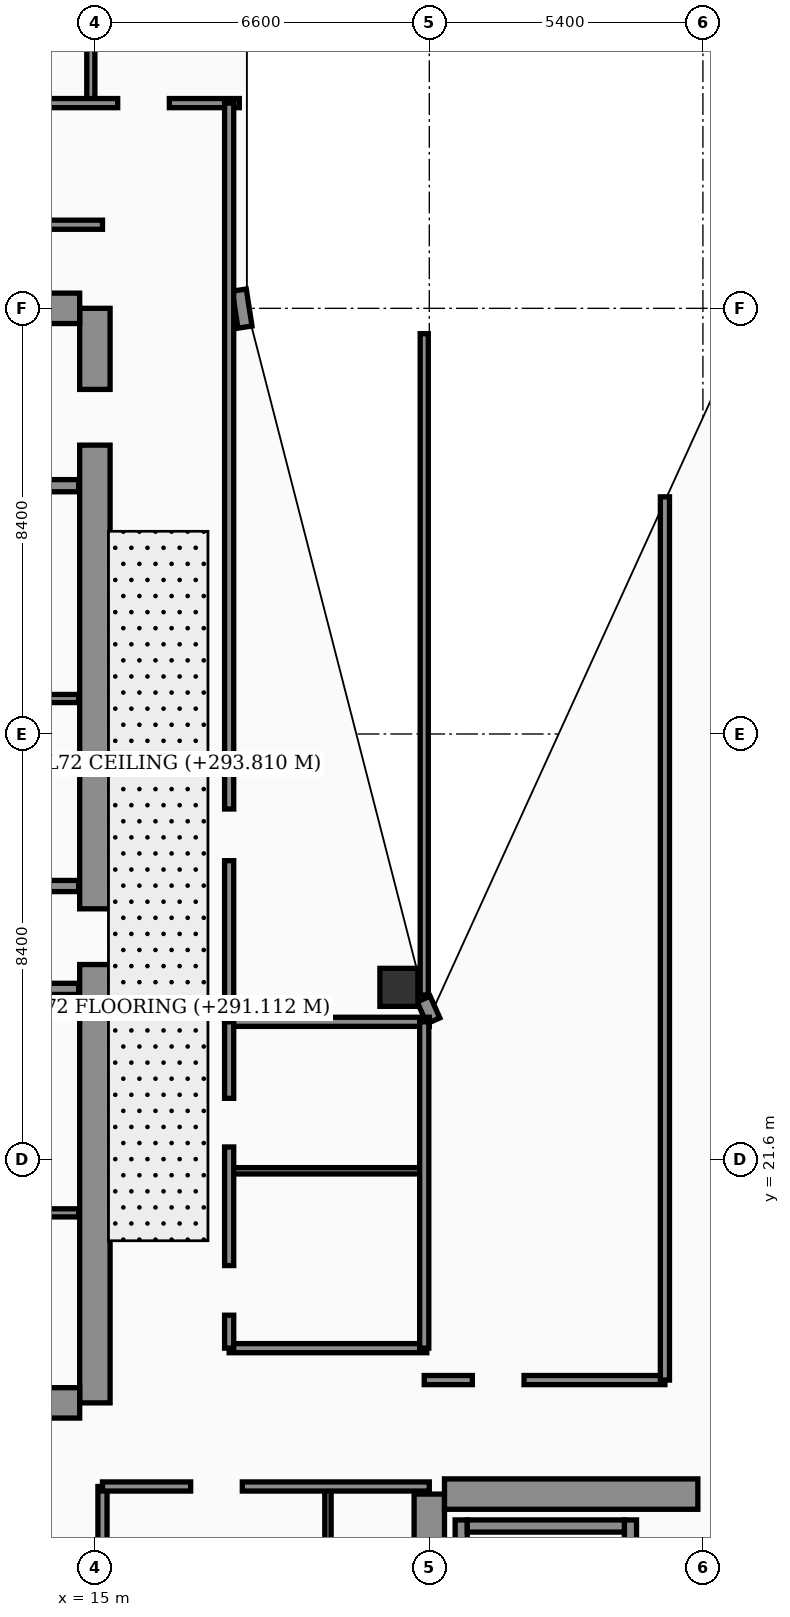
"""IFC4 building model, lengths in metres.
Left out: names, types, materials, properties, quantities, classifications, styles, units other than length and angle.
Written with IfcOpenShell. Run it as: python <this file> out.ifc"""

import sys

from ifc_helpers import new_model, si_unit, direction, frame, frame_2d, origin, origin_2d, place, context, subcontext, project, spatial, rectangle, hollow_rectangle, extrude, element, fill, save


model = new_model("IFC4")
c1 = context("Model", 3, precision=1e-05, world=origin(), true_north=direction((0.0, 1.0)))
c2 = subcontext(c1, "Body", "Model", "MODEL_VIEW")
j1 = project(units=[si_unit("LENGTHUNIT", "METRE"), si_unit("PLANEANGLEUNIT", "RADIAN")], contexts=[c1])
p1 = place(None, origin())
s1 = spatial("IfcSite", under=j1, at=p1, CompositionType="ELEMENT")
p2 = place(p1, origin())
s2 = spatial("IfcBuilding", under=s1, at=p2, CompositionType="ELEMENT")
p3 = place(p2, frame((0.0, 0.0, 291.1)))
s3 = spatial("IfcBuildingStorey", under=s2, at=p3, CompositionType="ELEMENT", Elevation=291.1)
p4 = place(p3, frame((15.0, 16.8, 0.0), z_axis=(0.0, 0.0, 1.0), x_axis=(0.0, 1.0, 0.0)))
e1 = element("IfcWall", 1, at=p4, inside=s3, PredefinedType="SHEAR", context=c2, shape_type="SweptSolid", body=[
    extrude(rectangle(XDim=21.6, YDim=0.6, at=frame_2d((10.8, 0.0))), origin(), (0.0, 0.0, 1.0), 3.56),
])
p5 = place(p4, frame((8.65, 0.0, 0.0)))
e2 = element("IfcOpeningElement", 2, at=p5, cuts=e1, PredefinedType="OPENING", context=c2, shape_type="SweptSolid", body=[
    extrude(rectangle(XDim=1.1, YDim=2.2, at=frame_2d((0.55, 1.1))), frame((0.0, 0.31, 0.0), z_axis=(0.0, -1.0, 0.0), x_axis=(1.0, 0.0, 0.0)), (0.0, 0.0, 1.0), 0.62),
])
p6 = place(p4, frame((18.9, 0.0, 0.0)))
e3 = element("IfcOpeningElement", 3, at=p6, cuts=e1, PredefinedType="OPENING", context=c2, shape_type="SweptSolid", body=[
    extrude(rectangle(XDim=1.1, YDim=2.2, at=frame_2d((0.55, 1.1))), frame((0.0, 0.31, 0.0), z_axis=(0.0, -1.0, 0.0), x_axis=(1.0, 0.0, 0.0)), (0.0, 0.0, 1.0), 0.62),
])
p7 = place(p3, frame((4.5, 38.4, 0.0), z_axis=(0.0, 0.0, 1.0), x_axis=(1.0, 0.0, 0.0)))
e4 = element("IfcWall", 4, at=p7, inside=s3, PredefinedType="SHEAR", context=c2, shape_type="SweptSolid", body=[
    extrude(rectangle(XDim=10.2, YDim=0.6, at=frame_2d((5.1, 0.0))), origin(), (0.0, 0.0, 1.0), 3.56),
])
p8 = place(p7, frame((5.8, 0.0, 0.0)))
e5 = element("IfcOpeningElement", 5, at=p8, cuts=e4, PredefinedType="OPENING", context=c2, shape_type="SweptSolid", body=[
    extrude(rectangle(XDim=1.1, YDim=2.2, at=frame_2d((0.55, 1.1))), frame((0.0, 0.31, 0.0), z_axis=(0.0, -1.0, 0.0), x_axis=(1.0, 0.0, 0.0)), (0.0, 0.0, 1.0), 0.62),
])
p9 = place(p3, frame((4.5, 16.8, 0.0), z_axis=(0.0, 0.0, 1.0), x_axis=(1.0, 0.0, 0.0)))
e6 = element("IfcWall", 6, at=p9, inside=s3, PredefinedType="SHEAR", context=c2, shape_type="SweptSolid", body=[
    extrude(rectangle(XDim=10.2, YDim=0.6, at=frame_2d((5.1, 0.0))), origin(), (0.0, 0.0, 1.0), 3.56),
])
p10 = place(p3, frame((21.6, 4.6, 0.0), z_axis=(0.0, 0.0, 1.0), x_axis=(0.0, 1.0, 0.0)))
e7 = element("IfcWall", 7, at=p10, inside=s3, PredefinedType="SHEAR", context=c2, shape_type="SweptSolid", body=[
    extrude(rectangle(XDim=10.4, YDim=0.6, at=frame_2d((5.2, 0.0))), origin(), (0.0, 0.0, 1.0), 3.56),
])
p11 = place(p3, frame((21.9, 15.0, 0.0), z_axis=(0.0, 0.0, 1.0), x_axis=(1.0, 0.0, 0.0)))
e8 = element("IfcWall", 8, at=p11, inside=s3, PredefinedType="SHEAR", context=c2, shape_type="SweptSolid", body=[
    extrude(rectangle(XDim=10.2, YDim=0.6, at=frame_2d((5.1, 0.0))), origin(), (0.0, 0.0, 1.0), 3.56),
])
p12 = place(p11, frame((5.0, 0.0, 0.0)))
e9 = element("IfcOpeningElement", 9, at=p12, cuts=e8, PredefinedType="OPENING", context=c2, shape_type="SweptSolid", body=[
    extrude(rectangle(XDim=1.1, YDim=2.2, at=frame_2d((0.55, 1.1))), frame((0.0, 0.31, 0.0), z_axis=(0.0, -1.0, 0.0), x_axis=(1.0, 0.0, 0.0)), (0.0, 0.0, 1.0), 0.62),
])
p13 = place(p3, frame((22.23, 4.9, 0.0), z_axis=(0.0, 0.0, 1.0), x_axis=(0.0, 1.0, 0.0)))
e10 = element("IfcWall", 10, at=p13, inside=s3, PredefinedType="SOLIDWALL", context=c2, shape_type="SweptSolid", body=[
    extrude(rectangle(XDim=9.59, YDim=0.24, at=frame_2d((4.795, 0.0))), origin(), (0.0, 0.0, 1.0), 3.56),
])
p14 = place(p3, frame((25.57, 4.9, 0.0), z_axis=(0.0, 0.0, 1.0), x_axis=(0.0, 1.0, 0.0)))
e11 = element("IfcWall", 11, at=p14, inside=s3, PredefinedType="SOLIDWALL", context=c2, shape_type="SweptSolid", body=[
    extrude(rectangle(XDim=9.59, YDim=0.24, at=frame_2d((4.795, 0.0))), origin(), (0.0, 0.0, 1.0), 3.56),
])
p15 = place(p14, frame((0.35, 0.0, 0.0)))
e12 = element("IfcOpeningElement", 12, at=p15, cuts=e11, PredefinedType="OPENING", context=c2, shape_type="SweptSolid", body=[
    extrude(rectangle(XDim=1.15, YDim=2.2, at=frame_2d((0.575, 1.1))), frame((0.0, 0.13, 0.0), z_axis=(0.0, -1.0, 0.0), x_axis=(1.0, 0.0, 0.0)), (0.0, 0.0, 1.0), 0.26),
])
p16 = place(p3, frame((22.35, 14.37, 0.0), z_axis=(0.0, 0.0, 1.0), x_axis=(1.0, 0.0, 0.0)))
e13 = element("IfcWall", 13, at=p16, inside=s3, PredefinedType="SOLIDWALL", context=c2, shape_type="SweptSolid", body=[
    extrude(rectangle(XDim=3.1, YDim=0.24, at=frame_2d((1.55, 0.0))), origin(), (0.0, 0.0, 1.0), 3.56),
])
p17 = place(p3, frame((21.0, 25.0, 0.0), z_axis=(0.0, 0.0, 1.0), x_axis=(1.0, 0.0, 0.0)))
e14 = element("IfcColumn", 14, at=p17, inside=s3, PredefinedType="COLUMN", context=c2, shape_type="SweptSolid", body=[
    extrude(hollow_rectangle(XDim=0.75, YDim=0.75, WallThickness=0.032, at=origin_2d()), origin(), (0.0, 0.0, 1.0), 3.56),
])
p18 = place(p3, frame((21.68, 24.34, 0.0), z_axis=(0.0, 0.0, 1.0), x_axis=(-0.40758134973, 0.913168901875, 0.0)))
e15 = element("IfcWall", 15, at=p18, inside=s3, PredefinedType="SOLIDWALL", context=c2, shape_type="SweptSolid", body=[
    extrude(rectangle(XDim=0.471, YDim=0.28, at=frame_2d((0.235, 0.0))), origin(), (0.0, 0.0, 1.0), 3.56),
])
p19 = place(p3, frame((17.962, 38.03, 0.0), z_axis=(0.0, 0.0, 1.0), x_axis=(-0.15141125477, 0.988470855377, 0.0)))
e16 = element("IfcWall", 16, at=p19, inside=s3, PredefinedType="SOLIDWALL", context=c2, shape_type="SweptSolid", body=[
    extrude(rectangle(XDim=0.739, YDim=0.28, at=frame_2d((0.369, 0.0))), origin(), (0.0, 0.0, 1.0), 3.56),
])
p20 = place(p3, frame((9.68, 20.55, 0.0), z_axis=(0.0, 0.0, 1.0), x_axis=(1.0, 0.0, 0.0)))
e17 = element("IfcWall", 17, at=p20, inside=s3, PredefinedType="PARTITIONING", context=c2, shape_type="SweptSolid", body=[
    extrude(rectangle(XDim=5.0, YDim=0.16, at=frame_2d((2.5, 0.0))), origin(), (0.0, 0.0, 1.0), 3.56),
])
p21 = place(p20, frame((1.1, 0.0, 0.0)))
e18 = element("IfcOpeningElement", 18, at=p21, cuts=e17, PredefinedType="OPENING", context=c2, shape_type="SweptSolid", body=[
    extrude(rectangle(XDim=0.98, YDim=2.15, at=frame_2d((0.49, 1.075))), frame((0.0, 0.09, 0.0), z_axis=(0.0, -1.0, 0.0), x_axis=(1.0, 0.0, 0.0)), (0.0, 0.0, 1.0), 0.18),
])
p22 = place(p3, frame((9.68, 24.97, 0.0), z_axis=(0.0, 0.0, 1.0), x_axis=(1.0, 0.0, 0.0)))
e19 = element("IfcWall", 19, at=p22, inside=s3, PredefinedType="SOLIDWALL", context=c2, shape_type="SweptSolid", body=[
    extrude(rectangle(XDim=5.0, YDim=0.22, at=frame_2d((2.5, 0.0))), origin(), (0.0, 0.0, 1.0), 2.99),
])
p23 = place(p22, frame((0.9, 0.0, 0.0)))
e20 = element("IfcOpeningElement", 20, at=p23, cuts=e19, PredefinedType="OPENING", context=c2, shape_type="SweptSolid", body=[
    extrude(rectangle(XDim=0.98, YDim=2.15, at=frame_2d((0.49, 1.075))), frame((0.0, 0.12, 0.0), z_axis=(0.0, -1.0, 0.0), x_axis=(1.0, 0.0, 0.0)), (0.0, 0.0, 1.0), 0.24),
])
p24 = place(p3, frame((12.25, 27.0, 0.0), z_axis=(0.0, 0.0, 1.0), x_axis=(1.0, 0.0, 0.0)))
e21 = element("IfcWall", 21, at=p24, inside=s3, PredefinedType="SOLIDWALL", context=c2, shape_type="SweptSolid", body=[
    extrude(rectangle(XDim=2.43, YDim=0.22, at=frame_2d((1.215, 0.0))), origin(), (0.0, 0.0, 1.0), 3.56),
])
p25 = place(p3, frame((12.25, 30.7, 0.0), z_axis=(0.0, 0.0, 1.0), x_axis=(1.0, 0.0, 0.0)))
e22 = element("IfcWall", 22, at=p25, inside=s3, PredefinedType="PARTITIONING", context=c2, shape_type="SweptSolid", body=[
    extrude(rectangle(XDim=2.43, YDim=0.16, at=frame_2d((1.215, 0.0))), origin(), (0.0, 0.0, 1.0), 3.56),
])
p26 = place(p25, frame((0.55, 0.0, 0.0)))
e23 = element("IfcOpeningElement", 23, at=p26, cuts=e22, PredefinedType="OPENING", context=c2, shape_type="SweptSolid", body=[
    extrude(rectangle(XDim=0.98, YDim=2.15, at=frame_2d((0.49, 1.075))), frame((0.0, 0.09, 0.0), z_axis=(0.0, -1.0, 0.0), x_axis=(1.0, 0.0, 0.0)), (0.0, 0.0, 1.0), 0.18),
])
p27 = place(p3, frame((9.66, 34.9, 0.0), z_axis=(0.0, 0.0, 1.0), x_axis=(1.0, 0.0, 0.0)))
e24 = element("IfcWall", 24, at=p27, inside=s3, PredefinedType="SOLIDWALL", context=c2, shape_type="SweptSolid", body=[
    extrude(rectangle(XDim=5.02, YDim=0.24, at=frame_2d((2.51, 0.0))), origin(), (0.0, 0.0, 1.0), 3.56),
])
p28 = place(p3, frame((15.15, 2.44, 0.0), z_axis=(0.0, 0.0, 1.0), x_axis=(0.0, 1.0, 0.0)))
e25 = element("IfcWall", 25, at=p28, inside=s3, PredefinedType="PARTITIONING", context=c2, shape_type="SweptSolid", body=[
    extrude(rectangle(XDim=12.71, YDim=0.18, at=frame_2d((6.355, 0.0))), origin(), (0.0, 0.0, 1.0), 3.09),
])
p29 = place(p3, frame((19.6, 2.44, 0.0), z_axis=(0.0, 0.0, 1.0), x_axis=(0.0, 1.0, 0.0)))
e26 = element("IfcWall", 26, at=p29, inside=s3, PredefinedType="PARTITIONING", context=c2, shape_type="SweptSolid", body=[
    extrude(rectangle(XDim=12.71, YDim=0.125, at=frame_2d((6.355, 0.0))), origin(), (0.0, 0.0, 1.0), 2.59),
])
p30 = place(p29, frame((4.34, 0.0, 0.0)))
e27 = element("IfcOpeningElement", 27, at=p30, cuts=e26, PredefinedType="OPENING", context=c2, shape_type="SweptSolid", body=[
    extrude(rectangle(XDim=0.96, YDim=2.2, at=frame_2d((0.48, 1.1))), frame((0.0, 0.073, 0.0), z_axis=(0.0, -1.0, 0.0), x_axis=(1.0, 0.0, 0.0)), (0.0, 0.0, 1.0), 0.145),
])
p31 = place(p29, frame((10.18, 0.0, 0.0)))
e28 = element("IfcOpeningElement", 28, at=p31, cuts=e26, PredefinedType="OPENING", context=c2, shape_type="SweptSolid", body=[
    extrude(rectangle(XDim=0.9, YDim=2.15, at=frame_2d((0.45, 1.075))), frame((0.0, 0.073, 0.0), z_axis=(0.0, -1.0, 0.0), x_axis=(1.0, 0.0, 0.0)), (0.0, 0.0, 1.0), 0.145),
])
p32 = place(p3, frame((15.15, 15.15, 0.0), z_axis=(0.0, 0.0, 1.0), x_axis=(1.0, 0.0, 0.0)))
e29 = element("IfcWall", 29, at=p32, inside=s3, PredefinedType="PARTITIONING", context=c2, shape_type="SweptSolid", body=[
    extrude(rectangle(XDim=6.45, YDim=0.18, at=frame_2d((3.225, 0.0))), origin(), (0.0, 0.0, 1.0), 2.59),
])
p33 = place(p32, frame((1.74, 0.0, 0.0)))
e30 = element("IfcOpeningElement", 30, at=p33, cuts=e29, PredefinedType="OPENING", context=c2, shape_type="SweptSolid", body=[
    extrude(rectangle(XDim=1.02, YDim=2.2, at=frame_2d((0.51, 1.1))), frame((0.0, 0.1, 0.0), z_axis=(0.0, -1.0, 0.0), x_axis=(1.0, 0.0, 0.0)), (0.0, 0.0, 1.0), 0.2),
])
p34 = place(p3, frame((14.92, 42.45, 0.0), z_axis=(0.0, 0.0, 1.0), x_axis=(0.0, 1.0, 0.0)))
e31 = element("IfcWall", 31, at=p34, inside=s3, PredefinedType="PARTITIONING", context=c2, shape_type="SweptSolid", body=[
    extrude(rectangle(XDim=5.35, YDim=0.16, at=frame_2d((2.675, 0.0))), origin(), (0.0, 0.0, 1.0), 3.09),
])
p35 = place(p3, frame((0.08, 42.45, 0.0), z_axis=(0.0, 0.0, 1.0), x_axis=(1.0, 0.0, 0.0)))
e32 = element("IfcWall", 32, at=p35, inside=s3, PredefinedType="PARTITIONING", context=c2, shape_type="SweptSolid", body=[
    extrude(rectangle(XDim=17.77, YDim=0.18, at=frame_2d((8.885, 0.0))), origin(), (0.0, 0.0, 1.0), 2.99),
])
p36 = place(p35, frame((0.9, 0.0, 0.0)))
e33 = element("IfcOpeningElement", 33, at=p36, cuts=e32, PredefinedType="OPENING", context=c2, shape_type="SweptSolid", body=[
    extrude(rectangle(XDim=1.02, YDim=2.2, at=frame_2d((0.51, 1.1))), frame((0.0, 0.1, 0.0), z_axis=(0.0, -1.0, 0.0), x_axis=(1.0, 0.0, 0.0)), (0.0, 0.0, 1.0), 0.2),
])
p37 = place(p35, frame((7.38, 0.0, 0.0)))
e34 = element("IfcOpeningElement", 34, at=p37, cuts=e32, PredefinedType="OPENING", context=c2, shape_type="SweptSolid", body=[
    extrude(rectangle(XDim=1.02, YDim=2.2, at=frame_2d((0.51, 1.1))), frame((0.0, 0.1, 0.0), z_axis=(0.0, -1.0, 0.0), x_axis=(1.0, 0.0, 0.0)), (0.0, 0.0, 1.0), 0.2),
])
p38 = place(p35, frame((15.37, 0.0, 0.0)))
e35 = element("IfcOpeningElement", 35, at=p38, cuts=e32, PredefinedType="OPENING", context=c2, shape_type="SweptSolid", body=[
    extrude(rectangle(XDim=1.02, YDim=2.2, at=frame_2d((0.51, 1.1))), frame((0.0, 0.1, 0.0), z_axis=(0.0, -1.0, 0.0), x_axis=(1.0, 0.0, 0.0)), (0.0, 0.0, 1.0), 0.2),
])
p39 = place(p3, frame((17.65, 24.3, 0.0), z_axis=(0.0, 0.0, 1.0), x_axis=(0.0, 1.0, 0.0)))
e36 = element("IfcWall", 36, at=p39, inside=s3, PredefinedType="PARTITIONING", context=c2, shape_type="SweptSolid", body=[
    extrude(rectangle(XDim=18.15, YDim=0.18, at=frame_2d((9.075, 0.0))), origin(), (0.0, 0.0, 1.0), 2.99),
])
p40 = place(p39, frame((3.2, 0.0, 0.0)))
e37 = element("IfcOpeningElement", 37, at=p40, cuts=e36, PredefinedType="OPENING", context=c2, shape_type="SweptSolid", body=[
    extrude(rectangle(XDim=1.02, YDim=2.2, at=frame_2d((0.51, 1.1))), frame((0.0, 0.1, 0.0), z_axis=(0.0, -1.0, 0.0), x_axis=(1.0, 0.0, 0.0)), (0.0, 0.0, 1.0), 0.2),
])
p41 = place(p3, frame((3.88, 40.05, 0.0), z_axis=(0.0, 0.0, 1.0), x_axis=(1.0, 0.0, 0.0)))
e38 = element("IfcWall", 38, at=p41, inside=s3, PredefinedType="PARTITIONING", context=c2, shape_type="SweptSolid", body=[
    extrude(rectangle(XDim=11.27, YDim=0.18, at=frame_2d((5.635, 0.0))), origin(), (0.0, 0.0, 1.0), 2.99),
])
p42 = place(p3, frame((17.65, 17.88, 0.0), z_axis=(0.0, 0.0, 1.0), x_axis=(1.0, 0.0, 0.0)))
e39 = element("IfcWall", 39, at=p42, inside=s3, PredefinedType="PARTITIONING", context=c2, shape_type="SweptSolid", body=[
    extrude(rectangle(XDim=3.9, YDim=0.18, at=frame_2d((1.95, 0.0))), origin(), (0.0, 0.0, 1.0), 3.09),
])
p43 = place(p3, frame((17.65, 21.38, 0.0), z_axis=(0.0, 0.0, 1.0), x_axis=(1.0, 0.0, 0.0)))
e40 = element("IfcWall", 40, at=p43, inside=s3, PredefinedType="PARTITIONING", context=c2, shape_type="SweptSolid", body=[
    extrude(rectangle(XDim=3.9, YDim=0.125, at=frame_2d((1.95, 0.0))), origin(), (0.0, 0.0, 1.0), 3.56),
])
p44 = place(p3, frame((17.65, 24.32, 0.0), z_axis=(0.0, 0.0, 1.0), x_axis=(1.0, 0.0, 0.0)))
e41 = element("IfcWall", 41, at=p44, inside=s3, PredefinedType="PARTITIONING", context=c2, shape_type="SweptSolid", body=[
    extrude(rectangle(XDim=3.95, YDim=0.18, at=frame_2d((1.975, 0.0))), origin(), (0.0, 0.0, 1.0), 3.56),
])
p45 = place(p3, frame((21.5, 17.88, 0.0), z_axis=(0.0, 0.0, 1.0), x_axis=(0.0, 1.0, 0.0)))
e42 = element("IfcWall", 42, at=p45, inside=s3, PredefinedType="PARTITIONING", context=c2, shape_type="SweptSolid", body=[
    extrude(rectangle(XDim=6.44, YDim=0.18, at=frame_2d((3.22, 0.0))), origin(), (0.0, 0.0, 1.0), 3.09),
])
p46 = place(p3, frame((17.65, 17.88, 0.0), z_axis=(0.0, 0.0, 1.0), x_axis=(0.0, 1.0, 0.0)))
e43 = element("IfcWall", 43, at=p46, inside=s3, PredefinedType="PARTITIONING", context=c2, shape_type="SweptSolid", body=[
    extrude(rectangle(XDim=6.44, YDim=0.18, at=frame_2d((3.22, 0.0))), origin(), (0.0, 0.0, 1.0), 3.09),
])
p47 = place(p46, frame((0.65, 0.0, 0.0)))
e44 = element("IfcOpeningElement", 44, at=p47, cuts=e43, PredefinedType="OPENING", context=c2, shape_type="SweptSolid", body=[
    extrude(rectangle(XDim=0.98, YDim=2.15, at=frame_2d((0.49, 1.075))), frame((0.0, 0.1, 0.0), z_axis=(0.0, -1.0, 0.0), x_axis=(1.0, 0.0, 0.0)), (0.0, 0.0, 1.0), 0.2),
])
p48 = place(p46, frame((3.97, 0.0, 0.0)))
e45 = element("IfcOpeningElement", 45, at=p48, cuts=e43, PredefinedType="OPENING", context=c2, shape_type="SweptSolid", body=[
    extrude(rectangle(XDim=0.96, YDim=2.2, at=frame_2d((0.48, 1.1))), frame((0.0, 0.1, 0.0), z_axis=(0.0, -1.0, 0.0), x_axis=(1.0, 0.0, 0.0)), (0.0, 0.0, 1.0), 0.2),
])
p49 = place(p3, frame((21.5, 24.85, 0.0), z_axis=(0.0, 0.0, 1.0), x_axis=(0.0, 1.0, 0.0)))
e46 = element("IfcWall", 46, at=p49, inside=s3, PredefinedType="PARTITIONING", context=c2, shape_type="SweptSolid", body=[
    extrude(rectangle(XDim=13.05, YDim=0.16, at=frame_2d((6.525, 0.0))), origin(), (0.0, 0.0, 1.0), 2.99),
])
p50 = place(p3, frame((21.5, 17.25, 0.0), z_axis=(0.0, 0.0, 1.0), x_axis=(1.0, 0.0, 0.0)))
e47 = element("IfcWall", 47, at=p50, inside=s3, PredefinedType="PARTITIONING", context=c2, shape_type="SweptSolid", body=[
    extrude(rectangle(XDim=4.75, YDim=0.18, at=frame_2d((2.375, 0.0))), origin(), (0.0, 0.0, 1.0), 3.56),
])
p51 = place(p50, frame((0.95, 0.0, 0.0)))
e48 = element("IfcOpeningElement", 48, at=p51, cuts=e47, PredefinedType="OPENING", context=c2, shape_type="SweptSolid", body=[
    extrude(rectangle(XDim=1.02, YDim=2.2, at=frame_2d((0.51, 1.1))), frame((0.0, 0.1, 0.0), z_axis=(0.0, -1.0, 0.0), x_axis=(1.0, 0.0, 0.0)), (0.0, 0.0, 1.0), 0.2),
])
p52 = place(p3, frame((26.25, 17.25, 0.0), z_axis=(0.0, 0.0, 1.0), x_axis=(0.0, 1.0, 0.0)))
e49 = element("IfcWall", 49, at=p52, inside=s3, PredefinedType="PARTITIONING", context=c2, shape_type="SweptSolid", body=[
    extrude(rectangle(XDim=17.43, YDim=0.18, at=frame_2d((8.715, 0.0))), origin(), (0.0, 0.0, 1.0), 3.09),
])
p53 = place(p33, origin())
e50 = element("IfcDoor", 50, at=p53, inside=s3, OperationType="SINGLE_SWING_LEFT", PredefinedType="DOOR", context=c2, shape_type="SweptSolid", body=[
    extrude(rectangle(XDim=1.02, YDim=2.2, at=frame_2d((0.51, 1.1))), frame((0.0, 0.025, 0.0), z_axis=(0.0, -1.0, 0.0), x_axis=(1.0, 0.0, 0.0)), (0.0, 0.0, 1.0), 0.05),
])
fill(e30, e50)
p54 = place(p38, origin())
e51 = element("IfcDoor", 51, at=p54, inside=s3, OperationType="SINGLE_SWING_RIGHT", PredefinedType="DOOR", context=c2, shape_type="SweptSolid", body=[
    extrude(rectangle(XDim=1.02, YDim=2.2, at=frame_2d((0.51, 1.1))), frame((0.0, 0.025, 0.0), z_axis=(0.0, -1.0, 0.0), x_axis=(1.0, 0.0, 0.0)), (0.0, 0.0, 1.0), 0.05),
])
fill(e35, e51)
p55 = place(p40, origin())
e52 = element("IfcDoor", 52, at=p55, inside=s3, OperationType="SINGLE_SWING_RIGHT", PredefinedType="DOOR", context=c2, shape_type="SweptSolid", body=[
    extrude(rectangle(XDim=1.02, YDim=2.2, at=frame_2d((0.51, 1.1))), frame((0.0, 0.025, 0.0), z_axis=(0.0, -1.0, 0.0), x_axis=(1.0, 0.0, 0.0)), (0.0, 0.0, 1.0), 0.05),
])
fill(e37, e52)
p56 = place(p47, origin())
e53 = element("IfcDoor", 53, at=p56, inside=s3, OperationType="SINGLE_SWING_LEFT", PredefinedType="DOOR", context=c2, shape_type="SweptSolid", body=[
    extrude(rectangle(XDim=0.98, YDim=2.15, at=frame_2d((0.49, 1.075))), frame((0.0, 0.025, 0.0), z_axis=(0.0, -1.0, 0.0), x_axis=(1.0, 0.0, 0.0)), (0.0, 0.0, 1.0), 0.05),
])
fill(e44, e53)
p57 = place(p48, origin())
e54 = element("IfcDoor", 54, at=p57, inside=s3, OperationType="SINGLE_SWING_RIGHT", PredefinedType="DOOR", context=c2, shape_type="SweptSolid", body=[
    extrude(rectangle(XDim=0.96, YDim=2.2, at=frame_2d((0.48, 1.1))), frame((0.0, 0.025, 0.0), z_axis=(0.0, -1.0, 0.0), x_axis=(1.0, 0.0, 0.0)), (0.0, 0.0, 1.0), 0.05),
])
fill(e45, e54)
p58 = place(p51, origin())
e55 = element("IfcDoor", 55, at=p58, inside=s3, OperationType="SINGLE_SWING_RIGHT", PredefinedType="DOOR", context=c2, shape_type="SweptSolid", body=[
    extrude(rectangle(XDim=1.02, YDim=2.2, at=frame_2d((0.51, 1.1))), frame((0.0, 0.025, 0.0), z_axis=(0.0, -1.0, 0.0), x_axis=(1.0, 0.0, 0.0)), (0.0, 0.0, 1.0), 0.05),
])
fill(e48, e55)
p59 = place(p5, origin())
e56 = element("IfcDoor", 56, at=p59, inside=s3, OperationType="SINGLE_SWING_LEFT", PredefinedType="DOOR", context=c2, shape_type="SweptSolid", body=[
    extrude(rectangle(XDim=1.1, YDim=2.2, at=frame_2d((0.55, 1.1))), frame((0.0, 0.025, 0.0), z_axis=(0.0, -1.0, 0.0), x_axis=(1.0, 0.0, 0.0)), (0.0, 0.0, 1.0), 0.05),
])
fill(e2, e56)
p60 = place(p6, origin())
e57 = element("IfcDoor", 57, at=p60, inside=s3, OperationType="DOUBLE_DOOR_SLIDING", PredefinedType="DOOR", context=c2, shape_type="SweptSolid", body=[
    extrude(rectangle(XDim=1.1, YDim=2.2, at=frame_2d((0.55, 1.1))), frame((0.0, 0.025, 0.0), z_axis=(0.0, -1.0, 0.0), x_axis=(1.0, 0.0, 0.0)), (0.0, 0.0, 1.0), 0.05),
])
fill(e3, e57)
p61 = place(p12, origin())
e58 = element("IfcDoor", 58, at=p61, inside=s3, OperationType="SINGLE_SWING_RIGHT", PredefinedType="DOOR", context=c2, shape_type="SweptSolid", body=[
    extrude(rectangle(XDim=1.1, YDim=2.2, at=frame_2d((0.55, 1.1))), frame((0.0, 0.025, 0.0), z_axis=(0.0, -1.0, 0.0), x_axis=(1.0, 0.0, 0.0)), (0.0, 0.0, 1.0), 0.05),
])
fill(e9, e58)
save(model, sys.argv[1])
